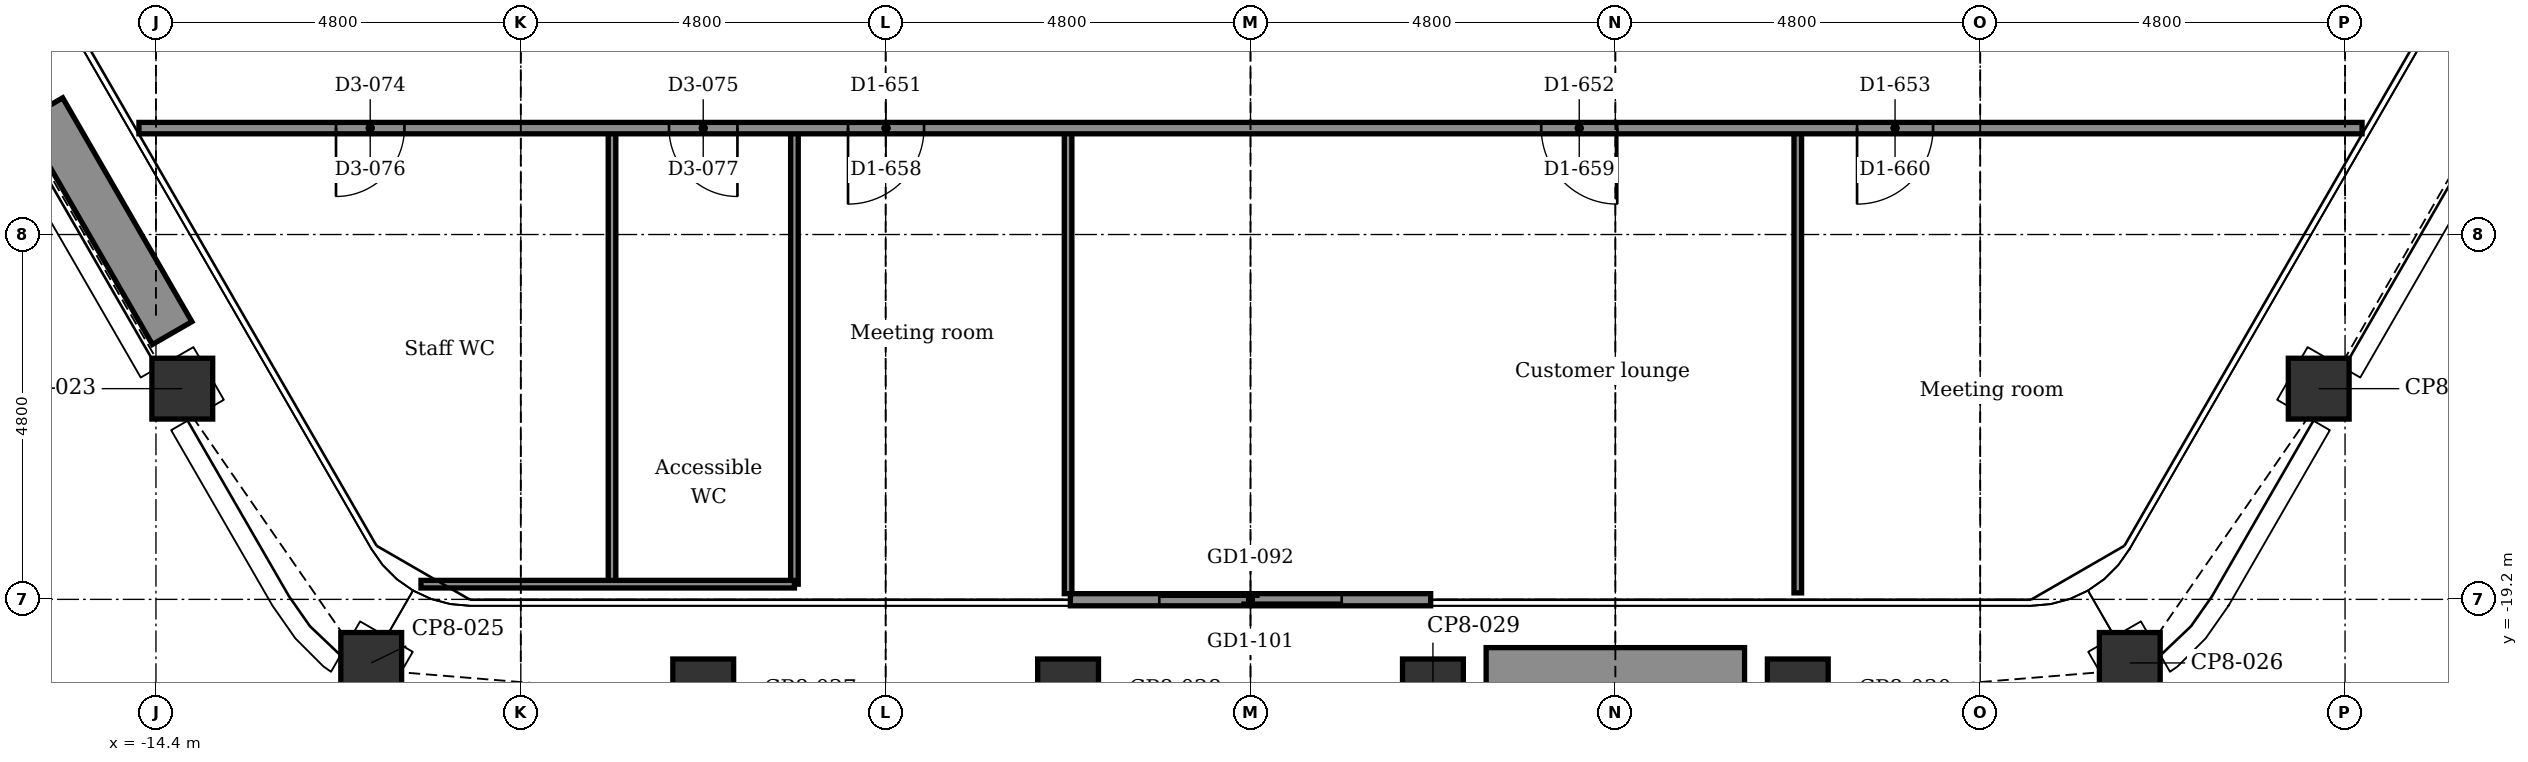
"""IFC4 building model, lengths in metres.
Left out: names, types, materials, properties, quantities, classifications, styles, units other than length and angle.
Written with IfcOpenShell. Run it as: python <this file> out.ifc"""

import sys

from ifc_helpers import new_model, si_unit, direction, frame, frame_2d, origin, origin_2d, place, context, subcontext, project, spatial, rectangle, extrude, element, fill, save


model = new_model("IFC4")
c1 = context("Model", 3, precision=1e-05, world=origin(), true_north=direction((0.0, 1.0)))
c2 = subcontext(c1, "Body", "Model", "MODEL_VIEW")
j1 = project(units=[si_unit("LENGTHUNIT", "METRE"), si_unit("PLANEANGLEUNIT", "RADIAN")], contexts=[c1])
p1 = place(None, origin())
s1 = spatial("IfcSite", under=j1, at=p1, CompositionType="ELEMENT")
p2 = place(p1, origin())
s2 = spatial("IfcBuilding", under=s1, at=p2, CompositionType="ELEMENT")
p3 = place(p2, frame((0.0, 0.0, 226.7)))
s3 = spatial("IfcBuildingStorey", under=s2, at=p3, CompositionType="ELEMENT", Elevation=226.7)
for number, where, z_axis, x_axis in (
    (1, (14.054, -16.428, -0.15), (0.0, 0.0, 1.0), (0.5, 0.866, 0.0)),
    (2, (11.568, -20.036, -0.15), (0.0, 0.0, 1.0), (0.866, 0.5, 0.0)),
    (3, (7.2, -20.385, -0.15), (0.0, 0.0, 1.0), (1.0, 0.0, 0.0)),
    (4, (2.4, -20.385, -0.15), (0.0, 0.0, 1.0), (1.0, 0.0, 0.0)),
    (5, (-2.4, -20.385, -0.15), (0.0, 0.0, 1.0), (1.0, 0.0, 0.0)),
    (6, (-7.2, -20.385, -0.15), (0.0, 0.0, 1.0), (1.0, 0.0, 0.0)),
    (7, (-11.568, -20.036, -0.15), (0.0, 0.0, 1.0), (0.5, 0.866, 0.0)),
    (8, (-14.054, -16.428, -0.15), (0.0, 0.0, 1.0), (0.866, 0.5, 0.0)),
):
    element("IfcColumn", number, at=place(p3, frame(where, z_axis=z_axis, x_axis=x_axis)), inside=s3, PredefinedType="COLUMN", context=c2, shape_type="SweptSolid", body=[
        extrude(rectangle(XDim=0.8, YDim=0.8, at=origin_2d()), origin(), (0.0, 0.0, 1.0), 3.9),
    ])
p4 = place(p3, frame((2.37, -19.205, 0.0), z_axis=(0.0, 0.0, 1.0), x_axis=(-1.0, 0.0, 0.0)))
e9 = element("IfcWall", 9, at=p4, inside=s3, PredefinedType="PARTITIONING", context=c2, shape_type="SweptSolid", body=[
    extrude(rectangle(XDim=4.74, YDim=0.16, at=frame_2d((2.37, 0.0))), origin(), (0.0, 0.0, 1.0), 3.75),
])
p5 = place(p4, frame((1.17, 0.0, 0.0)))
e10 = element("IfcOpeningElement", 10, at=p5, cuts=e9, PredefinedType="OPENING", context=c2, shape_type="SweptSolid", body=[
    extrude(rectangle(XDim=2.4, YDim=2.4, at=frame_2d((1.2, 1.2))), frame((0.0, 0.09, 0.0), z_axis=(0.0, -1.0, 0.0), x_axis=(1.0, 0.0, 0.0)), (0.0, 0.0, 1.0), 0.18),
])
p6 = place(p3, frame((6.5, -20.135, 0.0), z_axis=(0.0, 0.0, 1.0), x_axis=(-1.0, 0.0, 0.0)))
e11 = element("IfcWall", 11, at=p6, inside=s3, PredefinedType="USERDEFINED", context=c2, shape_type="SweptSolid", body=[
    extrude(rectangle(XDim=3.4, YDim=0.6, at=frame_2d((1.7, 0.0))), origin(), (0.0, 0.0, 1.0), 0.7),
])
p7 = place(p3, frame((-14.187, -15.697, 0.0), z_axis=(0.0, 0.0, 1.0), x_axis=(-0.499977295307, 0.866038511948, 0.0)))
e12 = element("IfcWall", 12, at=p7, inside=s3, PredefinedType="USERDEFINED", context=c2, shape_type="SweptSolid", body=[
    extrude(rectangle(XDim=3.4, YDim=0.6, at=frame_2d((1.7, 0.0))), origin(), (0.0, 0.0, 1.0), 0.7),
])
p8 = place(p3, frame((7.2, -19.115, 0.0), z_axis=(0.0, 0.0, 1.0), x_axis=(0.0, 1.0, 0.0)))
e13 = element("IfcWall", 13, at=p8, inside=s3, PredefinedType="PARTITIONING", context=c2, shape_type="SweptSolid", body=[
    extrude(rectangle(XDim=6.115, YDim=0.1, at=frame_2d((3.057, 0.0))), origin(), (0.0, 0.0, 1.0), 3.75),
])
p9 = place(p3, frame((-2.4, -19.125, 0.0), z_axis=(0.0, 0.0, 1.0), x_axis=(0.0, 1.0, 0.0)))
e14 = element("IfcWall", 14, at=p9, inside=s3, PredefinedType="PARTITIONING", context=c2, shape_type="SweptSolid", body=[
    extrude(rectangle(XDim=6.125, YDim=0.1, at=frame_2d((3.062, 0.0))), origin(), (0.0, 0.0, 1.0), 3.75),
])
for number, where, z_axis, x_axis in (
    (15, (-6.0, -19.0, 0.0), (0.0, 0.0, 1.0), (0.0, 1.0, 0.0)),
    (16, (-8.4, -19.0, 0.0), (0.0, 0.0, 1.0), (0.0, 1.0, 0.0)),
):
    element("IfcWall", number, at=place(p3, frame(where, z_axis=z_axis, x_axis=x_axis)), inside=s3, PredefinedType="PARTITIONING", context=c2, shape_type="SweptSolid", body=[
        extrude(rectangle(XDim=6.0, YDim=0.1, at=frame_2d((3.0, 0.0))), origin(), (0.0, 0.0, 1.0), 3.75),
    ])
p10 = place(p3, frame((-10.913, -19.0, 0.0), z_axis=(0.0, 0.0, 1.0), x_axis=(1.0, 0.0, 0.0)))
e17 = element("IfcWall", 17, at=p10, inside=s3, PredefinedType="PARTITIONING", context=c2, shape_type="SweptSolid", body=[
    extrude(rectangle(XDim=4.913, YDim=0.1, at=frame_2d((2.457, 0.0))), origin(), (0.0, 0.0, 1.0), 3.75),
])
p11 = place(p3, frame((-14.624, -13.0, 0.0), z_axis=(0.0, 0.0, 1.0), x_axis=(1.0, 0.0, 0.0)))
e18 = element("IfcWall", 18, at=p11, inside=s3, PredefinedType="PARTITIONING", context=c2, shape_type="SweptSolid", body=[
    extrude(rectangle(XDim=29.248, YDim=0.15, at=frame_2d((14.624, 0.0))), origin(), (0.0, 0.0, 1.0), 3.75),
])
p12 = place(p11, frame((2.593, 0.0, 0.0)))
e19 = element("IfcOpeningElement", 19, at=p12, cuts=e18, PredefinedType="OPENING", context=c2, shape_type="SweptSolid", body=[
    extrude(rectangle(XDim=0.9, YDim=2.1, at=frame_2d((0.45, 1.05))), frame((0.0, 0.085, 0.0), z_axis=(0.0, -1.0, 0.0), x_axis=(1.0, 0.0, 0.0)), (0.0, 0.0, 1.0), 0.17),
])
p13 = place(p11, frame((6.974, 0.0, 0.0)))
e20 = element("IfcOpeningElement", 20, at=p13, cuts=e18, PredefinedType="OPENING", context=c2, shape_type="SweptSolid", body=[
    extrude(rectangle(XDim=0.9, YDim=2.1, at=frame_2d((0.45, 1.05))), frame((0.0, 0.085, 0.0), z_axis=(0.0, -1.0, 0.0), x_axis=(1.0, 0.0, 0.0)), (0.0, 0.0, 1.0), 0.17),
])
p14 = place(p11, frame((9.329, 0.0, 0.0)))
e21 = element("IfcOpeningElement", 21, at=p14, cuts=e18, PredefinedType="OPENING", context=c2, shape_type="SweptSolid", body=[
    extrude(rectangle(XDim=1.0, YDim=2.1, at=frame_2d((0.5, 1.05))), frame((0.0, 0.085, 0.0), z_axis=(0.0, -1.0, 0.0), x_axis=(1.0, 0.0, 0.0)), (0.0, 0.0, 1.0), 0.17),
])
p15 = place(p11, frame((18.449, 0.0, 0.0)))
e22 = element("IfcOpeningElement", 22, at=p15, cuts=e18, PredefinedType="OPENING", context=c2, shape_type="SweptSolid", body=[
    extrude(rectangle(XDim=1.0, YDim=2.1, at=frame_2d((0.5, 1.05))), frame((0.0, 0.085, 0.0), z_axis=(0.0, -1.0, 0.0), x_axis=(1.0, 0.0, 0.0)), (0.0, 0.0, 1.0), 0.17),
])
p16 = place(p11, frame((22.604, 0.0, 0.0)))
e23 = element("IfcOpeningElement", 23, at=p16, cuts=e18, PredefinedType="OPENING", context=c2, shape_type="SweptSolid", body=[
    extrude(rectangle(XDim=1.0, YDim=2.1, at=frame_2d((0.5, 1.05))), frame((0.0, 0.085, 0.0), z_axis=(0.0, -1.0, 0.0), x_axis=(1.0, 0.0, 0.0)), (0.0, 0.0, 1.0), 0.17),
])
p17 = place(p5, origin())
e24 = element("IfcDoor", 24, at=p17, inside=s3, OperationType="DOUBLE_DOOR_SLIDING", PredefinedType="DOOR", context=c2, shape_type="SweptSolid", body=[
    extrude(rectangle(XDim=2.4, YDim=2.4, at=frame_2d((1.2, 1.2))), frame((0.0, 0.025, 0.0), z_axis=(0.0, -1.0, 0.0), x_axis=(1.0, 0.0, 0.0)), (0.0, 0.0, 1.0), 0.05),
])
fill(e10, e24)
p18 = place(p12, frame((0.9, 0.0, 0.0), z_axis=(0.0, 0.0, 1.0), x_axis=(-1.0, 0.0, 0.0)))
e25 = element("IfcDoor", 25, at=p18, inside=s3, OperationType="SINGLE_SWING_LEFT", PredefinedType="DOOR", context=c2, shape_type="SweptSolid", body=[
    extrude(rectangle(XDim=0.9, YDim=2.1, at=frame_2d((0.45, 1.05))), frame((0.0, 0.025, 0.0), z_axis=(0.0, -1.0, 0.0), x_axis=(1.0, 0.0, 0.0)), (0.0, 0.0, 1.0), 0.05),
])
fill(e19, e25)
p19 = place(p13, frame((0.9, 0.0, 0.0), z_axis=(0.0, 0.0, 1.0), x_axis=(-1.0, 0.0, 0.0)))
e26 = element("IfcDoor", 26, at=p19, inside=s3, OperationType="SINGLE_SWING_RIGHT", PredefinedType="DOOR", context=c2, shape_type="SweptSolid", body=[
    extrude(rectangle(XDim=0.9, YDim=2.1, at=frame_2d((0.45, 1.05))), frame((0.0, 0.025, 0.0), z_axis=(0.0, -1.0, 0.0), x_axis=(1.0, 0.0, 0.0)), (0.0, 0.0, 1.0), 0.05),
])
fill(e20, e26)
p20 = place(p14, frame((1.0, 0.0, 0.0), z_axis=(0.0, 0.0, 1.0), x_axis=(-1.0, 0.0, 0.0)))
e27 = element("IfcDoor", 27, at=p20, inside=s3, OperationType="SINGLE_SWING_LEFT", PredefinedType="DOOR", context=c2, shape_type="SweptSolid", body=[
    extrude(rectangle(XDim=1.0, YDim=2.1, at=frame_2d((0.5, 1.05))), frame((0.0, 0.025, 0.0), z_axis=(0.0, -1.0, 0.0), x_axis=(1.0, 0.0, 0.0)), (0.0, 0.0, 1.0), 0.05),
])
fill(e21, e27)
p21 = place(p15, frame((1.0, 0.0, 0.0), z_axis=(0.0, 0.0, 1.0), x_axis=(-1.0, 0.0, 0.0)))
e28 = element("IfcDoor", 28, at=p21, inside=s3, OperationType="SINGLE_SWING_RIGHT", PredefinedType="DOOR", context=c2, shape_type="SweptSolid", body=[
    extrude(rectangle(XDim=1.0, YDim=2.1, at=frame_2d((0.5, 1.05))), frame((0.0, 0.025, 0.0), z_axis=(0.0, -1.0, 0.0), x_axis=(1.0, 0.0, 0.0)), (0.0, 0.0, 1.0), 0.05),
])
fill(e22, e28)
p22 = place(p16, frame((1.0, 0.0, 0.0), z_axis=(0.0, 0.0, 1.0), x_axis=(-1.0, 0.0, 0.0)))
e29 = element("IfcDoor", 29, at=p22, inside=s3, OperationType="SINGLE_SWING_LEFT", PredefinedType="DOOR", context=c2, shape_type="SweptSolid", body=[
    extrude(rectangle(XDim=1.0, YDim=2.1, at=frame_2d((0.5, 1.05))), frame((0.0, 0.025, 0.0), z_axis=(0.0, -1.0, 0.0), x_axis=(1.0, 0.0, 0.0)), (0.0, 0.0, 1.0), 0.05),
])
fill(e23, e29)
save(model, sys.argv[1])
